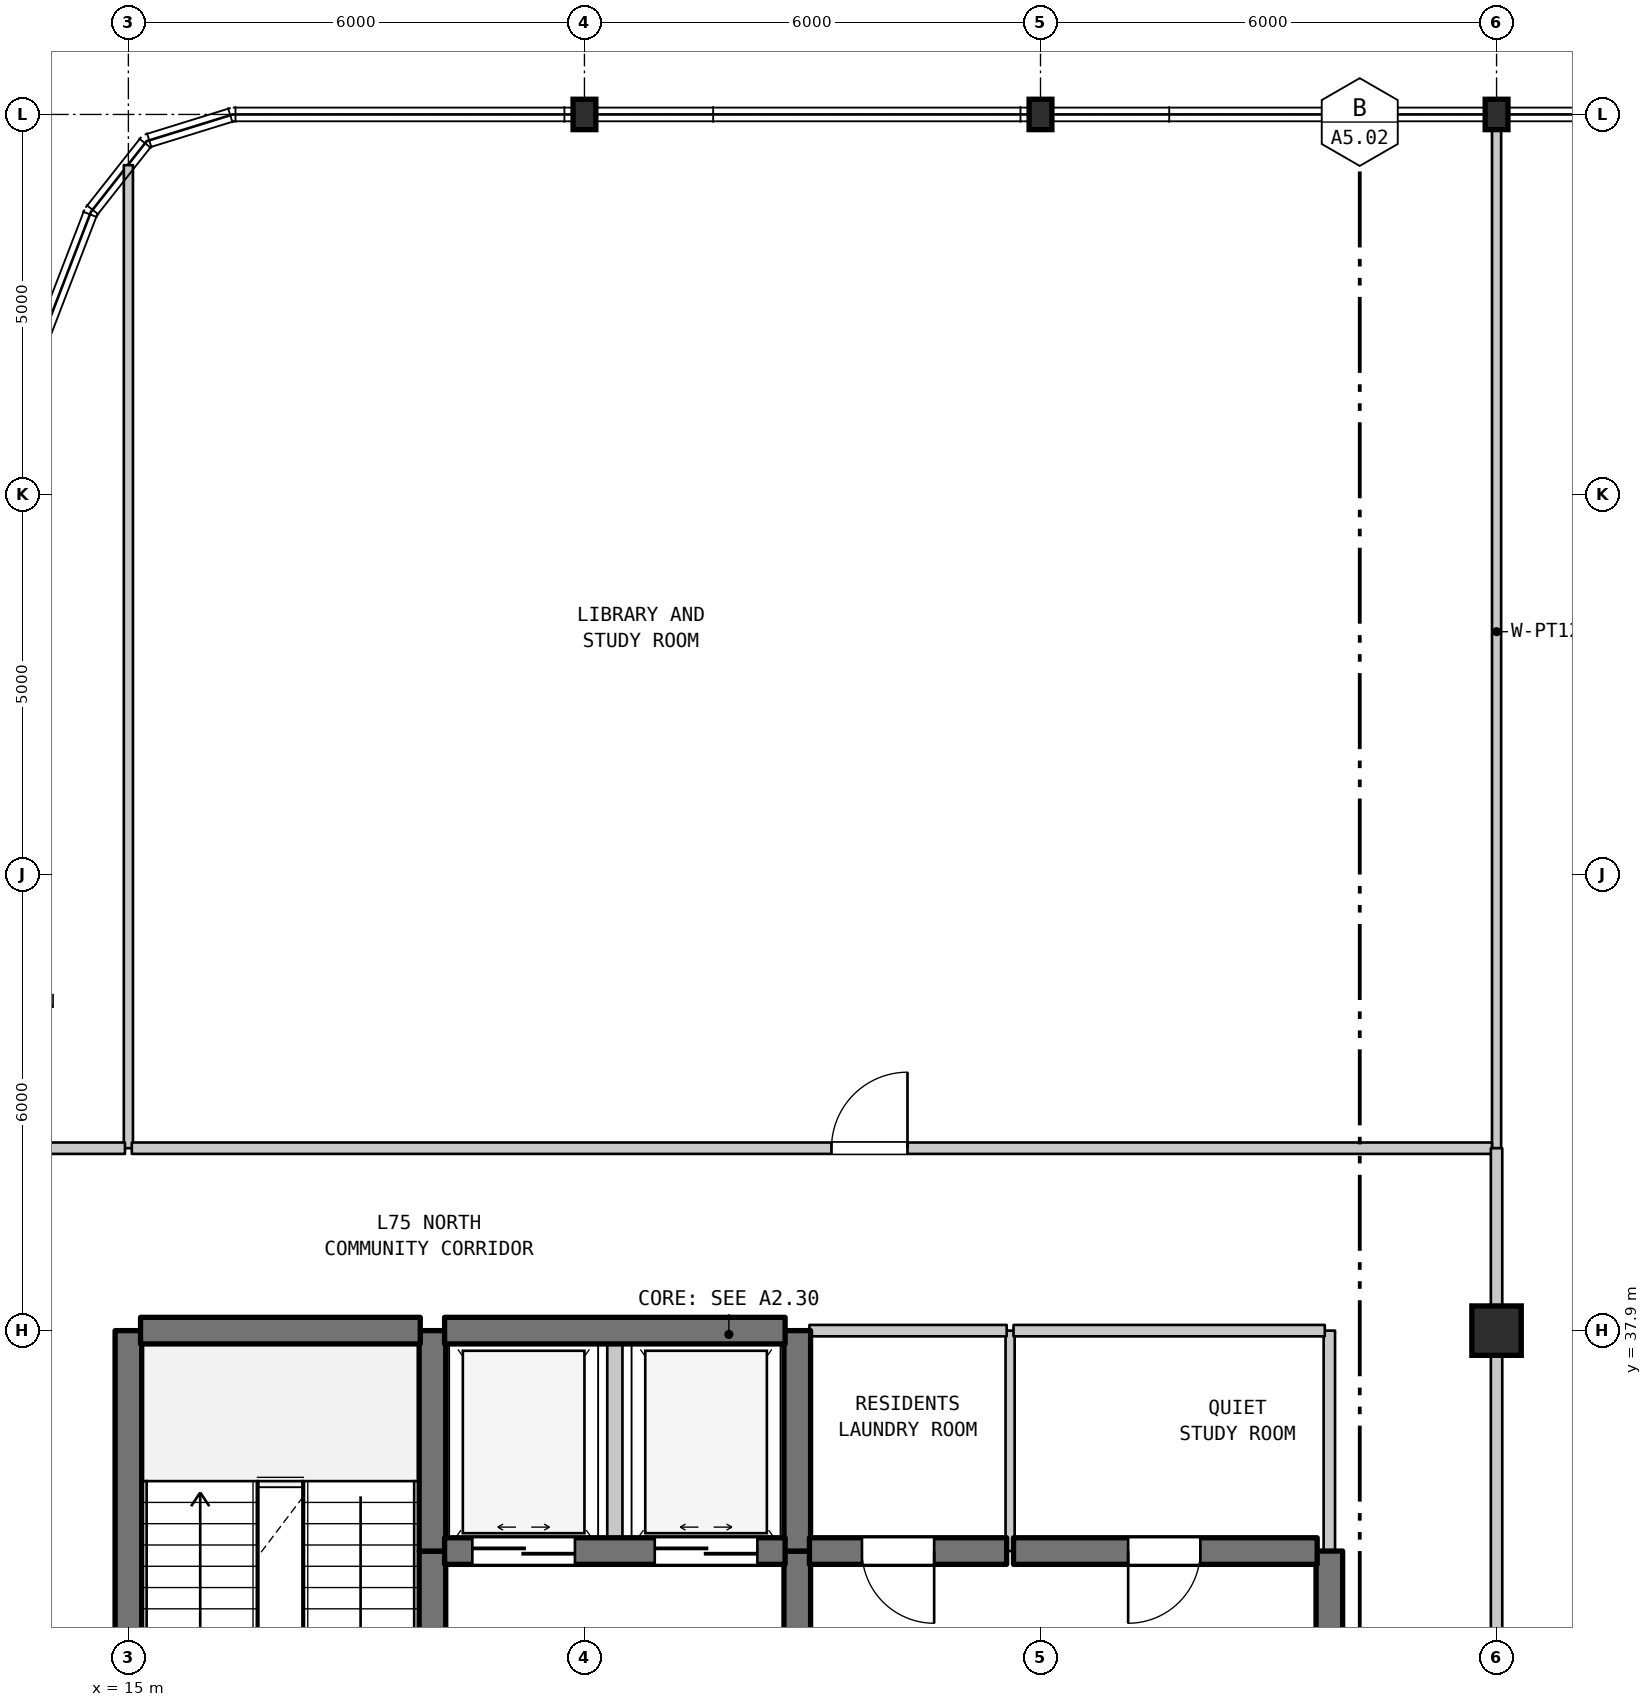
"""IFC4 building model, lengths in metres.
Left out: names, types, materials, properties, quantities, classifications, styles, units other than length and angle.
Written with IfcOpenShell. Run it as: python <this file> out.ifc"""

import sys

from ifc_helpers import new_model, si_unit, direction, frame, frame_2d, origin, origin_2d, place, context, subcontext, project, spatial, rectangle, i_section, extrude, element, fill, save


model = new_model("IFC4")
c1 = context("Model", 3, precision=1e-05, world=origin(), true_north=direction((0.0, 1.0)))
c2 = subcontext(c1, "Body", "Model", "MODEL_VIEW")
j1 = project(units=[si_unit("LENGTHUNIT", "METRE"), si_unit("PLANEANGLEUNIT", "RADIAN")], contexts=[c1])
p1 = place(None, origin())
s1 = spatial("IfcSite", under=j1, at=p1, CompositionType="ELEMENT")
p2 = place(p1, origin())
s2 = spatial("IfcBuilding", under=s1, at=p2, CompositionType="ELEMENT")
p3 = place(p2, frame((0.0, 0.0, 299.1)))
s3 = spatial("IfcBuildingStorey", under=s2, at=p3, CompositionType="ELEMENT", Elevation=299.1)
for number, where, z_axis, x_axis in (
    (1, (21.0, 53.9, 0.0), (0.0, 0.0, 1.0), (1.0, 0.0, 0.0)),
    (2, (27.0, 53.9, 0.0), (0.0, 0.0, 1.0), (1.0, 0.0, 0.0)),
):
    element("IfcColumn", number, at=place(p3, frame(where, z_axis=z_axis, x_axis=x_axis)), inside=s3, PredefinedType="COLUMN", context=c2, shape_type="SweptSolid", body=[
        extrude(i_section(OverallWidth=0.3, OverallDepth=0.4, WebThickness=0.013, FlangeThickness=0.024, FilletRadius=0.027, at=origin_2d()), origin(), (0.0, 0.0, 1.0), 4.5),
    ])
p4 = place(p3, frame((33.0, 37.9, 0.0), z_axis=(0.0, 0.0, 1.0), x_axis=(1.0, 0.0, 0.0)))
e3 = element("IfcColumn", 3, at=p4, inside=s3, PredefinedType="COLUMN", context=c2, shape_type="SweptSolid", body=[
    extrude(rectangle(XDim=0.65, YDim=0.65, at=origin_2d()), origin(), (0.0, 0.0, 1.0), 4.5),
])
p5 = place(p3, frame((33.0, 53.9, 0.0), z_axis=(0.0, 0.0, 1.0), x_axis=(1.0, 0.0, 0.0)))
e4 = element("IfcColumn", 4, at=p5, inside=s3, PredefinedType="COLUMN", context=c2, shape_type="SweptSolid", body=[
    extrude(i_section(OverallWidth=0.3, OverallDepth=0.4, WebThickness=0.013, FlangeThickness=0.024, FilletRadius=0.027, at=origin_2d()), origin(), (0.0, 0.0, 1.0), 4.5),
])
p6 = place(p3, frame((15.0, 31.1, 0.0), z_axis=(0.0, 0.0, 1.0), x_axis=(0.0, 1.0, 0.0)))
e5 = element("IfcWall", 5, at=p6, inside=s3, PredefinedType="SHEAR", context=c2, shape_type="SweptSolid", body=[
    extrude(rectangle(XDim=6.8, YDim=0.35, at=frame_2d((3.4, 0.0))), origin(), (0.0, 0.0, 1.0), 4.19),
])
p7 = place(p3, frame((15.0, 40.3, 0.0), z_axis=(0.0, 0.0, 1.0), x_axis=(0.0, 1.0, 0.0)))
e6 = element("IfcWall", 6, at=p7, inside=s3, PredefinedType="PARTITIONING", context=c2, shape_type="SweptSolid", body=[
    extrude(rectangle(XDim=12.933, YDim=0.12, at=frame_2d((6.466, 0.0))), origin(), (0.0, 0.0, 1.0), 4.19),
])
p8 = place(p3, frame((19.0, 29.5, 0.0), z_axis=(0.0, 0.0, 1.0), x_axis=(0.0, 1.0, 0.0)))
e7 = element("IfcWall", 7, at=p8, inside=s3, PredefinedType="SHEAR", context=c2, shape_type="SweptSolid", body=[
    extrude(rectangle(XDim=5.5, YDim=0.35, at=frame_2d((2.75, 0.0))), origin(), (0.0, 0.0, 1.0), 4.19),
])
p9 = place(p8, frame((2.025, 0.0, 0.0)))
e8 = element("IfcOpeningElement", 8, at=p9, cuts=e7, PredefinedType="OPENING", context=c2, shape_type="SweptSolid", body=[
    extrude(rectangle(XDim=1.1, YDim=2.15, at=frame_2d((0.55, 1.075))), frame((0.0, 0.185, 0.0), z_axis=(0.0, -1.0, 0.0), x_axis=(1.0, 0.0, 0.0)), (0.0, 0.0, 1.0), 0.37),
])
p10 = place(p3, frame((19.0, 35.0, 0.0), z_axis=(0.0, 0.0, 1.0), x_axis=(0.0, 1.0, 0.0)))
e9 = element("IfcWall", 9, at=p10, inside=s3, PredefinedType="SHEAR", context=c2, shape_type="SweptSolid", body=[
    extrude(rectangle(XDim=2.9, YDim=0.35, at=frame_2d((1.45, 0.0))), origin(), (0.0, 0.0, 1.0), 4.19),
])
p11 = place(p3, frame((21.4, 35.0, 0.0), z_axis=(0.0, 0.0, 1.0), x_axis=(0.0, 1.0, 0.0)))
e10 = element("IfcWall", 10, at=p11, inside=s3, PredefinedType="STANDARD", context=c2, shape_type="SweptSolid", body=[
    extrude(rectangle(XDim=2.9, YDim=0.2, at=frame_2d((1.45, 0.0))), origin(), (0.0, 0.0, 1.0), 4.19),
])
p12 = place(p3, frame((23.8, 31.5, 0.0), z_axis=(0.0, 0.0, 1.0), x_axis=(0.0, 1.0, 0.0)))
e11 = element("IfcWall", 11, at=p12, inside=s3, PredefinedType="SHEAR", context=c2, shape_type="SweptSolid", body=[
    extrude(rectangle(XDim=3.5, YDim=0.35, at=frame_2d((1.75, 0.0))), origin(), (0.0, 0.0, 1.0), 4.19),
])
p13 = place(p12, frame((1.127, 0.0, 0.0)))
e12 = element("IfcOpeningElement", 12, at=p13, cuts=e11, PredefinedType="OPENING", context=c2, shape_type="SweptSolid", body=[
    extrude(rectangle(XDim=1.1, YDim=2.15, at=frame_2d((0.55, 1.075))), frame((0.0, 0.185, 0.0), z_axis=(0.0, -1.0, 0.0), x_axis=(1.0, 0.0, 0.0)), (0.0, 0.0, 1.0), 0.37),
])
p14 = place(p3, frame((23.8, 35.0, 0.0), z_axis=(0.0, 0.0, 1.0), x_axis=(0.0, 1.0, 0.0)))
e13 = element("IfcWall", 13, at=p14, inside=s3, PredefinedType="SHEAR", context=c2, shape_type="SweptSolid", body=[
    extrude(rectangle(XDim=2.9, YDim=0.35, at=frame_2d((1.45, 0.0))), origin(), (0.0, 0.0, 1.0), 4.19),
])
p15 = place(p3, frame((26.6, 35.0, 0.0), z_axis=(0.0, 0.0, 1.0), x_axis=(0.0, 1.0, 0.0)))
e14 = element("IfcWall", 14, at=p15, inside=s3, PredefinedType="PARTITIONING", context=c2, shape_type="SweptSolid", body=[
    extrude(rectangle(XDim=2.9, YDim=0.12, at=frame_2d((1.45, 0.0))), origin(), (0.0, 0.0, 1.0), 4.19),
])
p16 = place(p3, frame((30.8, 31.5, 0.0), z_axis=(0.0, 0.0, 1.0), x_axis=(0.0, 1.0, 0.0)))
e15 = element("IfcWall", 15, at=p16, inside=s3, PredefinedType="SHEAR", context=c2, shape_type="SweptSolid", body=[
    extrude(rectangle(XDim=3.5, YDim=0.35, at=frame_2d((1.75, 0.0))), origin(), (0.0, 0.0, 1.0), 4.19),
])
p17 = place(p16, frame((1.15, 0.0, 0.0)))
e16 = element("IfcOpeningElement", 16, at=p17, cuts=e15, PredefinedType="OPENING", context=c2, shape_type="SweptSolid", body=[
    extrude(rectangle(XDim=1.2, YDim=2.2, at=frame_2d((0.6, 1.1))), frame((0.0, 0.185, 0.0), z_axis=(0.0, -1.0, 0.0), x_axis=(1.0, 0.0, 0.0)), (0.0, 0.0, 1.0), 0.37),
])
p18 = place(p3, frame((30.8, 35.0, 0.0), z_axis=(0.0, 0.0, 1.0), x_axis=(0.0, 1.0, 0.0)))
e17 = element("IfcWall", 17, at=p18, inside=s3, PredefinedType="STANDARD", context=c2, shape_type="SweptSolid", body=[
    extrude(rectangle(XDim=2.9, YDim=0.15, at=frame_2d((1.45, 0.0))), origin(), (0.0, 0.0, 1.0), 4.19),
])
p19 = place(p3, frame((33.0, 27.9, 0.0), z_axis=(0.0, 0.0, 1.0), x_axis=(0.0, 1.0, 0.0)))
e18 = element("IfcWall", 18, at=p19, inside=s3, PredefinedType="STANDARD", context=c2, shape_type="SweptSolid", body=[
    extrude(rectangle(XDim=10.0, YDim=0.15, at=frame_2d((5.0, 0.0))), origin(), (0.0, 0.0, 1.0), 3.69),
])
p20 = place(p3, frame((33.0, 40.3, 0.0), z_axis=(0.0, 0.0, 1.0), x_axis=(0.0, 1.0, 0.0)))
e19 = element("IfcWall", 19, at=p20, inside=s3, PredefinedType="PARTITIONING", context=c2, shape_type="SweptSolid", body=[
    extrude(rectangle(XDim=13.59, YDim=0.12, at=frame_2d((6.795, 0.0))), origin(), (0.0, 0.0, 1.0), 3.59),
])
p21 = place(p3, frame((19.16, 35.0, 0.0), z_axis=(0.0, 0.0, 1.0), x_axis=(1.0, 0.0, 0.0)))
e20 = element("IfcWall", 20, at=p21, inside=s3, PredefinedType="SHEAR", context=c2, shape_type="SweptSolid", body=[
    extrude(rectangle(XDim=4.48, YDim=0.35, at=frame_2d((2.24, 0.0))), origin(), (0.0, 0.0, 1.0), 4.19),
])
p22 = place(p21, frame((0.365, 0.0, 0.0)))
e21 = element("IfcOpeningElement", 21, at=p22, cuts=e20, PredefinedType="OPENING", context=c2, shape_type="SweptSolid", body=[
    extrude(rectangle(XDim=1.35, YDim=2.2, at=frame_2d((0.675, 1.1))), frame((0.0, 0.185, 0.0), z_axis=(0.0, -1.0, 0.0), x_axis=(1.0, 0.0, 0.0)), (0.0, 0.0, 1.0), 0.37),
])
p23 = place(p21, frame((2.765, 0.0, 0.0)))
e22 = element("IfcOpeningElement", 22, at=p23, cuts=e20, PredefinedType="OPENING", context=c2, shape_type="SweptSolid", body=[
    extrude(rectangle(XDim=1.35, YDim=2.2, at=frame_2d((0.675, 1.1))), frame((0.0, 0.185, 0.0), z_axis=(0.0, -1.0, 0.0), x_axis=(1.0, 0.0, 0.0)), (0.0, 0.0, 1.0), 0.37),
])
p24 = place(p3, frame((23.96, 35.0, 0.0), z_axis=(0.0, 0.0, 1.0), x_axis=(1.0, 0.0, 0.0)))
e23 = element("IfcWall", 23, at=p24, inside=s3, PredefinedType="SHEAR", context=c2, shape_type="SweptSolid", body=[
    extrude(rectangle(XDim=2.595, YDim=0.35, at=frame_2d((1.297, 0.0))), origin(), (0.0, 0.0, 1.0), 4.19),
])
p25 = place(p24, frame((0.691, 0.0, 0.0)))
e24 = element("IfcOpeningElement", 24, at=p25, cuts=e23, PredefinedType="OPENING", context=c2, shape_type="SweptSolid", body=[
    extrude(rectangle(XDim=0.95, YDim=2.15, at=frame_2d((0.475, 1.075))), frame((0.0, 0.185, 0.0), z_axis=(0.0, -1.0, 0.0), x_axis=(1.0, 0.0, 0.0)), (0.0, 0.0, 1.0), 0.37),
])
p26 = place(p3, frame((26.645, 35.0, 0.0), z_axis=(0.0, 0.0, 1.0), x_axis=(1.0, 0.0, 0.0)))
e25 = element("IfcWall", 25, at=p26, inside=s3, PredefinedType="SHEAR", context=c2, shape_type="SweptSolid", body=[
    extrude(rectangle(XDim=3.995, YDim=0.35, at=frame_2d((1.998, 0.0))), origin(), (0.0, 0.0, 1.0), 4.19),
])
p27 = place(p26, frame((1.508, 0.0, 0.0)))
e26 = element("IfcOpeningElement", 26, at=p27, cuts=e25, PredefinedType="OPENING", context=c2, shape_type="SweptSolid", body=[
    extrude(rectangle(XDim=0.95, YDim=2.15, at=frame_2d((0.475, 1.075))), frame((0.0, 0.185, 0.0), z_axis=(0.0, -1.0, 0.0), x_axis=(1.0, 0.0, 0.0)), (0.0, 0.0, 1.0), 0.37),
])
p28 = place(p3, frame((15.16, 37.9, 0.0), z_axis=(0.0, 0.0, 1.0), x_axis=(1.0, 0.0, 0.0)))
e27 = element("IfcWall", 27, at=p28, inside=s3, PredefinedType="SHEAR", context=c2, shape_type="SweptSolid", body=[
    extrude(rectangle(XDim=3.68, YDim=0.35, at=frame_2d((1.84, 0.0))), origin(), (0.0, 0.0, 1.0), 4.19),
])
p29 = place(p3, frame((19.16, 37.9, 0.0), z_axis=(0.0, 0.0, 1.0), x_axis=(1.0, 0.0, 0.0)))
e28 = element("IfcWall", 28, at=p29, inside=s3, PredefinedType="SHEAR", context=c2, shape_type="SweptSolid", body=[
    extrude(rectangle(XDim=4.48, YDim=0.35, at=frame_2d((2.24, 0.0))), origin(), (0.0, 0.0, 1.0), 4.19),
])
p30 = place(p3, frame((23.96, 37.9, 0.0), z_axis=(0.0, 0.0, 1.0), x_axis=(1.0, 0.0, 0.0)))
e29 = element("IfcWall", 29, at=p30, inside=s3, PredefinedType="STANDARD", context=c2, shape_type="SweptSolid", body=[
    extrude(rectangle(XDim=2.595, YDim=0.15, at=frame_2d((1.297, 0.0))), origin(), (0.0, 0.0, 1.0), 3.69),
])
p31 = place(p3, frame((26.645, 37.9, 0.0), z_axis=(0.0, 0.0, 1.0), x_axis=(1.0, 0.0, 0.0)))
e30 = element("IfcWall", 30, at=p31, inside=s3, PredefinedType="STANDARD", context=c2, shape_type="SweptSolid", body=[
    extrude(rectangle(XDim=4.095, YDim=0.15, at=frame_2d((2.047, 0.0))), origin(), (0.0, 0.0, 1.0), 3.69),
])
p32 = place(p3, frame((12.66, 40.3, 0.0), z_axis=(0.0, 0.0, 1.0), x_axis=(1.0, 0.0, 0.0)))
e31 = element("IfcWall", 31, at=p32, inside=s3, PredefinedType="STANDARD", context=c2, shape_type="SweptSolid", body=[
    extrude(rectangle(XDim=2.295, YDim=0.15, at=frame_2d((1.147, 0.0))), origin(), (0.0, 0.0, 1.0), 4.19),
])
p33 = place(p3, frame((15.045, 40.3, 0.0), z_axis=(0.0, 0.0, 1.0), x_axis=(1.0, 0.0, 0.0)))
e32 = element("IfcWall", 32, at=p33, inside=s3, PredefinedType="STANDARD", context=c2, shape_type="SweptSolid", body=[
    extrude(rectangle(XDim=17.895, YDim=0.15, at=frame_2d((8.948, 0.0))), origin(), (0.0, 0.0, 1.0), 4.19),
])
p34 = place(p33, frame((9.205, 0.0, 0.0)))
e33 = element("IfcOpeningElement", 33, at=p34, cuts=e32, PredefinedType="OPENING", context=c2, shape_type="SweptSolid", body=[
    extrude(rectangle(XDim=1.0, YDim=2.15, at=frame_2d((0.5, 1.075))), frame((0.0, 0.085, 0.0), z_axis=(0.0, -1.0, 0.0), x_axis=(1.0, 0.0, 0.0)), (0.0, 0.0, 1.0), 0.17),
])
p35 = place(p3, frame((33.0, 37.9, 0.0), z_axis=(0.0, 0.0, 1.0), x_axis=(0.0, 1.0, 0.0)))
e34 = element("IfcWall", 34, at=p35, inside=s3, PredefinedType="STANDARD", context=c2, shape_type="SweptSolid", body=[
    extrude(rectangle(XDim=2.4, YDim=0.15, at=frame_2d((1.2, 0.0))), origin(), (0.0, 0.0, 1.0), 3.59),
])
p36 = place(p22, origin())
e35 = element("IfcDoor", 35, at=p36, inside=s3, OperationType="DOUBLE_DOOR_SLIDING", PredefinedType="DOOR", context=c2, shape_type="SweptSolid", body=[
    extrude(rectangle(XDim=1.35, YDim=2.2, at=frame_2d((0.675, 1.1))), frame((0.0, 0.025, 0.0), z_axis=(0.0, -1.0, 0.0), x_axis=(1.0, 0.0, 0.0)), (0.0, 0.0, 1.0), 0.05),
])
fill(e21, e35)
p37 = place(p23, origin())
e36 = element("IfcDoor", 36, at=p37, inside=s3, OperationType="DOUBLE_DOOR_SLIDING", PredefinedType="DOOR", context=c2, shape_type="SweptSolid", body=[
    extrude(rectangle(XDim=1.35, YDim=2.2, at=frame_2d((0.675, 1.1))), frame((0.0, 0.025, 0.0), z_axis=(0.0, -1.0, 0.0), x_axis=(1.0, 0.0, 0.0)), (0.0, 0.0, 1.0), 0.05),
])
fill(e22, e36)
p38 = place(p25, frame((0.95, 0.0, 0.0), z_axis=(0.0, 0.0, 1.0), x_axis=(-1.0, 0.0, 0.0)))
e37 = element("IfcDoor", 37, at=p38, inside=s3, OperationType="SINGLE_SWING_RIGHT", PredefinedType="DOOR", context=c2, shape_type="SweptSolid", body=[
    extrude(rectangle(XDim=0.95, YDim=2.15, at=frame_2d((0.475, 1.075))), frame((0.0, 0.025, 0.0), z_axis=(0.0, -1.0, 0.0), x_axis=(1.0, 0.0, 0.0)), (0.0, 0.0, 1.0), 0.05),
])
fill(e24, e37)
p39 = place(p27, frame((0.95, 0.0, 0.0), z_axis=(0.0, 0.0, 1.0), x_axis=(-1.0, 0.0, 0.0)))
e38 = element("IfcDoor", 38, at=p39, inside=s3, OperationType="SINGLE_SWING_LEFT", PredefinedType="DOOR", context=c2, shape_type="SweptSolid", body=[
    extrude(rectangle(XDim=0.95, YDim=2.15, at=frame_2d((0.475, 1.075))), frame((0.0, 0.025, 0.0), z_axis=(0.0, -1.0, 0.0), x_axis=(1.0, 0.0, 0.0)), (0.0, 0.0, 1.0), 0.05),
])
fill(e26, e38)
p40 = place(p34, origin())
e39 = element("IfcDoor", 39, at=p40, inside=s3, OperationType="SINGLE_SWING_RIGHT", PredefinedType="DOOR", context=c2, shape_type="SweptSolid", body=[
    extrude(rectangle(XDim=1.0, YDim=2.15, at=frame_2d((0.5, 1.075))), frame((0.0, 0.025, 0.0), z_axis=(0.0, -1.0, 0.0), x_axis=(1.0, 0.0, 0.0)), (0.0, 0.0, 1.0), 0.05),
])
fill(e33, e39)
save(model, sys.argv[1])
